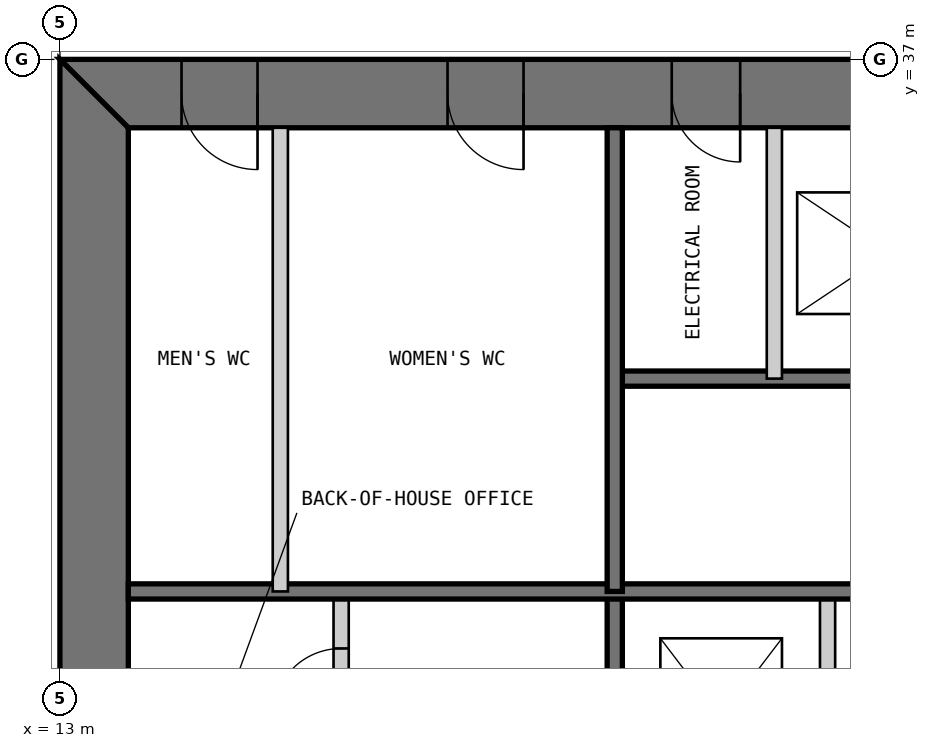
"""IFC4 building model, lengths in metres.
Left out: names, types, materials, properties, quantities, classifications, styles, units other than length and angle.
Written with IfcOpenShell. Run it as: python <this file> out.ifc"""

import sys

from ifc_helpers import new_model, si_unit, direction, frame, frame_2d, origin, place, context, subcontext, project, spatial, polyline, rectangle, outline, extrude, element, fill, save


model = new_model("IFC4")
c1 = context("Model", 3, precision=1e-05, world=origin(), true_north=direction((0.0, 1.0)))
c2 = subcontext(c1, "Body", "Model", "MODEL_VIEW")
j1 = project(units=[si_unit("LENGTHUNIT", "METRE"), si_unit("PLANEANGLEUNIT", "RADIAN")], contexts=[c1])
p1 = place(None, origin())
s1 = spatial("IfcSite", under=j1, at=p1, CompositionType="ELEMENT")
p2 = place(p1, origin())
s2 = spatial("IfcBuilding", under=s1, at=p2, CompositionType="ELEMENT")
p3 = place(p2, frame((0.0, 0.0, 102.4)))
s3 = spatial("IfcBuildingStorey", under=s2, at=p3, CompositionType="ELEMENT", Elevation=102.4)
p4 = place(p3, frame((37.0, 36.55, 0.0), z_axis=(0.0, 0.0, 1.0), x_axis=(-1.0, 0.0, 0.0)))
e1 = element("IfcWall", 1, at=p4, inside=s3, PredefinedType="SHEAR", context=c2, shape_type="SweptSolid", body=[
    extrude(outline(polyline([(0.0, -0.45), (24.0, -0.45), (23.1, 0.45), (0.9, 0.45), (0.0, -0.45)])), origin(), (0.0, 0.0, 1.0), 4.0),
])
p5 = place(p4, frame((4.9, 0.0, 0.0)))
e2 = element("IfcOpeningElement", 2, at=p5, cuts=e1, PredefinedType="OPENING", context=c2, shape_type="SweptSolid", body=[
    extrude(rectangle(XDim=1.0, YDim=2.2, at=frame_2d((0.5, 1.1))), frame((0.0, 0.46, 0.0), z_axis=(0.0, -1.0, 0.0), x_axis=(1.0, 0.0, 0.0)), (0.0, 0.0, 1.0), 0.92),
])
p6 = place(p4, frame((8.9, 0.0, 0.0)))
e3 = element("IfcOpeningElement", 3, at=p6, cuts=e1, PredefinedType="OPENING", context=c2, shape_type="SweptSolid", body=[
    extrude(rectangle(XDim=1.1, YDim=2.2, at=frame_2d((0.55, 1.1))), frame((0.0, 0.46, 0.0), z_axis=(0.0, -1.0, 0.0), x_axis=(1.0, 0.0, 0.0)), (0.0, 0.0, 1.0), 0.92),
])
p7 = place(p4, frame((15.05, 0.0, 0.0)))
e4 = element("IfcOpeningElement", 4, at=p7, cuts=e1, PredefinedType="OPENING", context=c2, shape_type="SweptSolid", body=[
    extrude(rectangle(XDim=0.9, YDim=2.2, at=frame_2d((0.45, 1.1))), frame((0.0, 0.46, 0.0), z_axis=(0.0, -1.0, 0.0), x_axis=(1.0, 0.0, 0.0)), (0.0, 0.0, 1.0), 0.92),
])
p8 = place(p4, frame((17.9, 0.0, 0.0)))
e5 = element("IfcOpeningElement", 5, at=p8, cuts=e1, PredefinedType="OPENING", context=c2, shape_type="SweptSolid", body=[
    extrude(rectangle(XDim=1.0, YDim=2.2, at=frame_2d((0.5, 1.1))), frame((0.0, 0.46, 0.0), z_axis=(0.0, -1.0, 0.0), x_axis=(1.0, 0.0, 0.0)), (0.0, 0.0, 1.0), 0.92),
])
p9 = place(p4, frame((21.4, 0.0, 0.0)))
e6 = element("IfcOpeningElement", 6, at=p9, cuts=e1, PredefinedType="OPENING", context=c2, shape_type="SweptSolid", body=[
    extrude(rectangle(XDim=1.0, YDim=2.2, at=frame_2d((0.5, 1.1))), frame((0.0, 0.46, 0.0), z_axis=(0.0, -1.0, 0.0), x_axis=(1.0, 0.0, 0.0)), (0.0, 0.0, 1.0), 0.92),
])
p10 = place(p3, frame((13.45, 36.1, 0.0), z_axis=(0.0, 0.0, 1.0), x_axis=(0.0, -1.0, 0.0)))
e7 = element("IfcWall", 7, at=p10, inside=s3, PredefinedType="SHEAR", context=c2, shape_type="SweptSolid", body=[
    extrude(outline(polyline([(-0.9, -0.45), (23.1, -0.45), (22.2, 0.45), (0.0, 0.45), (-0.9, -0.45)])), origin(), (0.0, 0.0, 1.0), 4.0),
])
p11 = place(p10, frame((20.2, 0.0, 0.0)))
e8 = element("IfcOpeningElement", 8, at=p11, cuts=e7, PredefinedType="OPENING", context=c2, shape_type="SweptSolid", body=[
    extrude(rectangle(XDim=1.0, YDim=2.2, at=frame_2d((0.5, 1.1))), frame((0.0, 0.46, 0.0), z_axis=(0.0, -1.0, 0.0), x_axis=(1.0, 0.0, 0.0)), (0.0, 0.0, 1.0), 0.92),
])
p12 = place(p10, frame((17.25, 0.0, 0.0)))
e9 = element("IfcOpeningElement", 9, at=p12, cuts=e7, PredefinedType="OPENING", context=c2, shape_type="SweptSolid", body=[
    extrude(rectangle(XDim=0.9, YDim=2.2, at=frame_2d((0.45, 1.1))), frame((0.0, 0.46, 0.0), z_axis=(0.0, -1.0, 0.0), x_axis=(1.0, 0.0, 0.0)), (0.0, 0.0, 1.0), 0.92),
])
p13 = place(p3, frame((16.7, 13.9, 0.0), z_axis=(0.0, 0.0, 1.0), x_axis=(0.0, 1.0, 0.0)))
e10 = element("IfcWall", 10, at=p13, inside=s3, PredefinedType="PARTITIONING", context=c2, shape_type="SweptSolid", body=[
    extrude(rectangle(XDim=16.1, YDim=0.2, at=frame_2d((8.05, 0.0))), origin(), (0.0, 0.0, 1.0), 3.8),
])
p14 = place(p13, frame((9.25, 0.0, 0.0)))
e11 = element("IfcOpeningElement", 11, at=p14, cuts=e10, PredefinedType="OPENING", context=c2, shape_type="SweptSolid", body=[
    extrude(rectangle(XDim=0.9, YDim=2.2, at=frame_2d((0.45, 1.1))), frame((0.0, 0.11, 0.0), z_axis=(0.0, -1.0, 0.0), x_axis=(1.0, 0.0, 0.0)), (0.0, 0.0, 1.0), 0.22),
])
p15 = place(p13, frame((14.45, 0.0, 0.0)))
e12 = element("IfcOpeningElement", 12, at=p15, cuts=e10, PredefinedType="OPENING", context=c2, shape_type="SweptSolid", body=[
    extrude(rectangle(XDim=0.9, YDim=2.2, at=frame_2d((0.45, 1.1))), frame((0.0, 0.11, 0.0), z_axis=(0.0, -1.0, 0.0), x_axis=(1.0, 0.0, 0.0)), (0.0, 0.0, 1.0), 0.22),
])
p16 = place(p3, frame((20.3, 13.9, 0.0), z_axis=(0.0, 0.0, 1.0), x_axis=(0.0, 1.0, 0.0)))
e13 = element("IfcWall", 13, at=p16, inside=s3, PredefinedType="SOLIDWALL", context=c2, shape_type="SweptSolid", body=[
    extrude(rectangle(XDim=16.1, YDim=0.2, at=frame_2d((8.05, 0.0))), origin(), (0.0, 0.0, 1.0), 3.8),
])
p17 = place(p16, frame((7.217, 0.0, 0.0)))
e14 = element("IfcOpeningElement", 14, at=p17, cuts=e13, PredefinedType="OPENING", context=c2, shape_type="SweptSolid", body=[
    extrude(rectangle(XDim=1.1, YDim=2.2, at=frame_2d((0.55, 1.1))), frame((0.0, 0.11, 0.0), z_axis=(0.0, -1.0, 0.0), x_axis=(1.0, 0.0, 0.0)), (0.0, 0.0, 1.0), 0.22),
])
p18 = place(p16, frame((10.55, 0.0, 0.0)))
e15 = element("IfcOpeningElement", 15, at=p18, cuts=e13, PredefinedType="OPENING", context=c2, shape_type="SweptSolid", body=[
    extrude(rectangle(XDim=1.1, YDim=2.2, at=frame_2d((0.55, 1.1))), frame((0.0, 0.11, 0.0), z_axis=(0.0, -1.0, 0.0), x_axis=(1.0, 0.0, 0.0)), (0.0, 0.0, 1.0), 0.22),
])
p19 = place(p16, frame((13.883, 0.0, 0.0)))
e16 = element("IfcOpeningElement", 16, at=p19, cuts=e13, PredefinedType="OPENING", context=c2, shape_type="SweptSolid", body=[
    extrude(rectangle(XDim=1.1, YDim=2.2, at=frame_2d((0.55, 1.1))), frame((0.0, 0.11, 0.0), z_axis=(0.0, -1.0, 0.0), x_axis=(1.0, 0.0, 0.0)), (0.0, 0.0, 1.0), 0.22),
])
p20 = place(p3, frame((23.1, 20.0, 0.0), z_axis=(0.0, 0.0, 1.0), x_axis=(0.0, 1.0, 0.0)))
e17 = element("IfcWall", 17, at=p20, inside=s3, PredefinedType="PARTITIONING", context=c2, shape_type="SweptSolid", body=[
    extrude(rectangle(XDim=10.0, YDim=0.2, at=frame_2d((5.0, 0.0))), origin(), (0.0, 0.0, 1.0), 3.8),
])
p21 = place(p3, frame((29.7, 32.8, 0.0), z_axis=(0.0, 0.0, 1.0), x_axis=(-1.0, 0.0, 0.0)))
e18 = element("IfcWall", 18, at=p21, inside=s3, PredefinedType="SOLIDWALL", context=c2, shape_type="SweptSolid", body=[
    extrude(rectangle(XDim=9.4, YDim=0.2, at=frame_2d((4.7, 0.0))), origin(), (0.0, 0.0, 1.0), 3.8),
])
p22 = place(p21, frame((0.25, 0.0, 0.0)))
e19 = element("IfcOpeningElement", 19, at=p22, cuts=e18, PredefinedType="OPENING", context=c2, shape_type="SweptSolid", body=[
    extrude(rectangle(XDim=1.0, YDim=2.2, at=frame_2d((0.5, 1.1))), frame((0.0, 0.11, 0.0), z_axis=(0.0, -1.0, 0.0), x_axis=(1.0, 0.0, 0.0)), (0.0, 0.0, 1.0), 0.22),
])
p23 = place(p3, frame((29.7, 30.0, 0.0), z_axis=(0.0, 0.0, 1.0), x_axis=(-1.0, 0.0, 0.0)))
e20 = element("IfcWall", 20, at=p23, inside=s3, PredefinedType="SOLIDWALL", context=c2, shape_type="SweptSolid", body=[
    extrude(rectangle(XDim=15.8, YDim=0.2, at=frame_2d((7.9, 0.0))), origin(), (0.0, 0.0, 1.0), 3.8),
])
p24 = place(p3, frame((22.4, 36.1, 0.0), z_axis=(0.0, 0.0, 1.0), x_axis=(0.0, -1.0, 0.0)))
e21 = element("IfcWall", 21, at=p24, inside=s3, PredefinedType="PARTITIONING", context=c2, shape_type="SweptSolid", body=[
    extrude(rectangle(XDim=3.3, YDim=0.2, at=frame_2d((1.65, 0.0))), origin(), (0.0, 0.0, 1.0), 3.8),
])
p25 = place(p3, frame((20.3, 36.1, 0.0), z_axis=(0.0, 0.0, 1.0), x_axis=(0.0, -1.0, 0.0)))
e22 = element("IfcWall", 22, at=p25, inside=s3, PredefinedType="SOLIDWALL", context=c2, shape_type="SweptSolid", body=[
    extrude(rectangle(XDim=6.1, YDim=0.2, at=frame_2d((3.05, 0.0))), origin(), (0.0, 0.0, 1.0), 3.8),
])
p26 = place(p3, frame((15.9, 36.1, 0.0), z_axis=(0.0, 0.0, 1.0), x_axis=(0.0, -1.0, 0.0)))
e23 = element("IfcWall", 23, at=p26, inside=s3, PredefinedType="PARTITIONING", context=c2, shape_type="SweptSolid", body=[
    extrude(rectangle(XDim=6.1, YDim=0.2, at=frame_2d((3.05, 0.0))), origin(), (0.0, 0.0, 1.0), 3.8),
])
p27 = place(p15, origin())
e24 = element("IfcDoor", 24, at=p27, inside=s3, OperationType="SINGLE_SWING_LEFT", PredefinedType="DOOR", context=c2, shape_type="SweptSolid", body=[
    extrude(rectangle(XDim=0.9, YDim=2.2, at=frame_2d((0.45, 1.1))), frame((0.0, 0.025, 0.0), z_axis=(0.0, -1.0, 0.0), x_axis=(1.0, 0.0, 0.0)), (0.0, 0.0, 1.0), 0.05),
])
fill(e12, e24)
p28 = place(p7, origin())
e25 = element("IfcDoor", 25, at=p28, inside=s3, OperationType="SINGLE_SWING_LEFT", PredefinedType="DOOR", context=c2, shape_type="SweptSolid", body=[
    extrude(rectangle(XDim=0.9, YDim=2.2, at=frame_2d((0.45, 1.1))), frame((0.0, 0.025, 0.0), z_axis=(0.0, -1.0, 0.0), x_axis=(1.0, 0.0, 0.0)), (0.0, 0.0, 1.0), 0.05),
    extrude(outline(polyline([(0.0, 0.0), (0.04, 0.0), (0.04, 2.16), (0.86, 2.16), (0.86, 0.0), (0.9, 0.0), (0.9, 2.2), (0.0, 2.2), (0.0, 0.0)])), frame((0.0, 0.3, 0.0), z_axis=(0.0, -1.0, 0.0), x_axis=(1.0, 0.0, 0.0)), (0.0, 0.0, 1.0), 0.6),
])
fill(e4, e25)
p29 = place(p8, origin())
e26 = element("IfcDoor", 26, at=p29, inside=s3, OperationType="SINGLE_SWING_LEFT", PredefinedType="DOOR", context=c2, shape_type="SweptSolid", body=[
    extrude(rectangle(XDim=1.0, YDim=2.2, at=frame_2d((0.5, 1.1))), frame((0.0, 0.025, 0.0), z_axis=(0.0, -1.0, 0.0), x_axis=(1.0, 0.0, 0.0)), (0.0, 0.0, 1.0), 0.05),
    extrude(outline(polyline([(0.0, 0.0), (0.04, 0.0), (0.04, 2.16), (0.96, 2.16), (0.96, 0.0), (1.0, 0.0), (1.0, 2.2), (0.0, 2.2), (0.0, 0.0)])), frame((0.0, 0.3, 0.0), z_axis=(0.0, -1.0, 0.0), x_axis=(1.0, 0.0, 0.0)), (0.0, 0.0, 1.0), 0.6),
])
fill(e5, e26)
p30 = place(p9, origin())
e27 = element("IfcDoor", 27, at=p30, inside=s3, OperationType="SINGLE_SWING_LEFT", PredefinedType="DOOR", context=c2, shape_type="SweptSolid", body=[
    extrude(rectangle(XDim=1.0, YDim=2.2, at=frame_2d((0.5, 1.1))), frame((0.0, 0.025, 0.0), z_axis=(0.0, -1.0, 0.0), x_axis=(1.0, 0.0, 0.0)), (0.0, 0.0, 1.0), 0.05),
    extrude(outline(polyline([(0.0, 0.0), (0.04, 0.0), (0.04, 2.16), (0.96, 2.16), (0.96, 0.0), (1.0, 0.0), (1.0, 2.2), (0.0, 2.2), (0.0, 0.0)])), frame((0.0, 0.3, 0.0), z_axis=(0.0, -1.0, 0.0), x_axis=(1.0, 0.0, 0.0)), (0.0, 0.0, 1.0), 0.6),
])
fill(e6, e27)
save(model, sys.argv[1])
